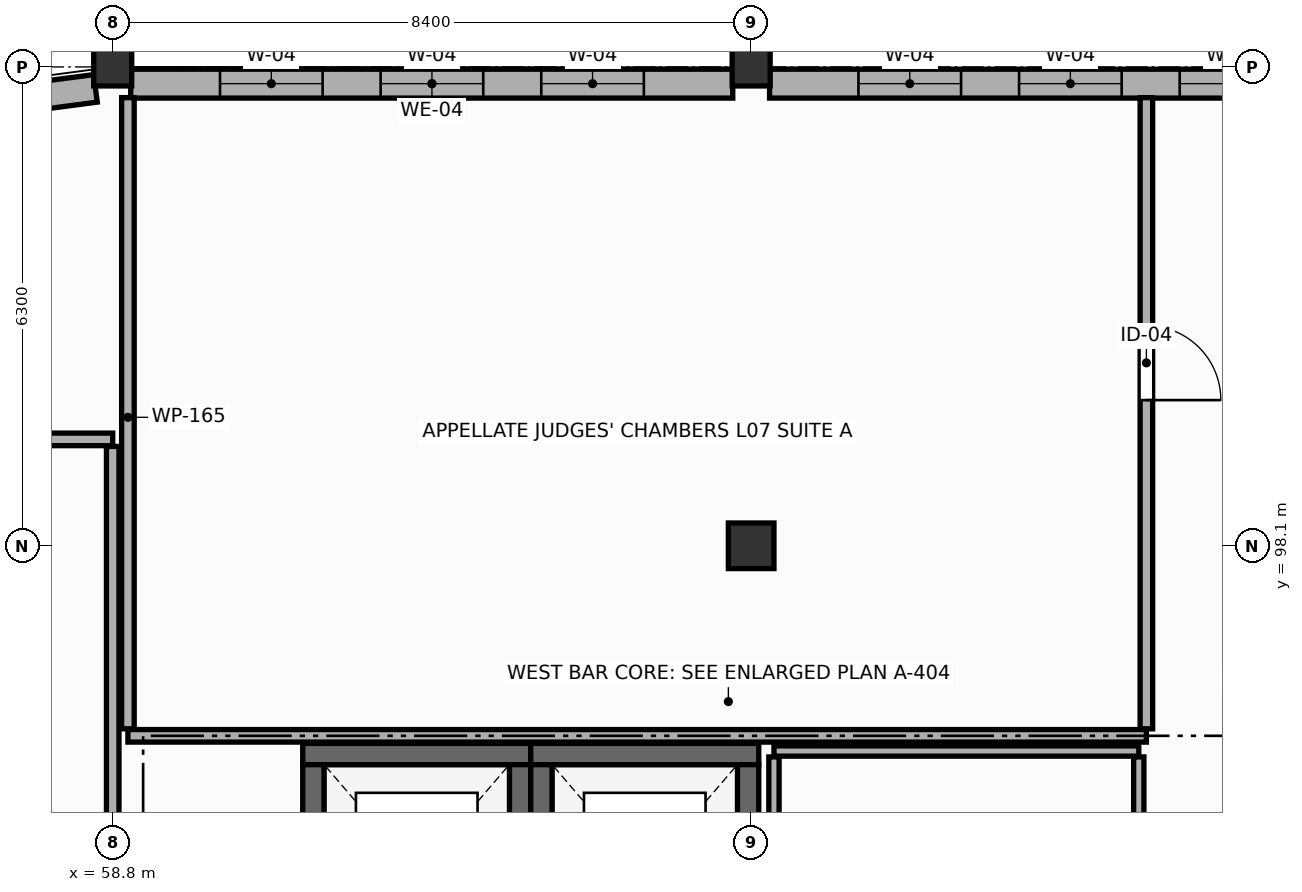
"""IFC4 building model, lengths in metres.
Left out: names, types, materials, properties, quantities, classifications, styles, units other than length and angle.
Written with IfcOpenShell. Run it as: python <this file> out.ifc"""

import sys

from ifc_helpers import new_model, si_unit, direction, frame, frame_2d, origin, origin_2d, place, context, subcontext, project, spatial, rectangle, extrude, element, fill, save


model = new_model("IFC4")
c1 = context("Model", 3, precision=1e-05, world=origin(), true_north=direction((0.0, 1.0)))
c2 = subcontext(c1, "Body", "Model", "MODEL_VIEW")
j1 = project(units=[si_unit("LENGTHUNIT", "METRE"), si_unit("PLANEANGLEUNIT", "RADIAN")], contexts=[c1])
p1 = place(None, origin())
s1 = spatial("IfcSite", under=j1, at=p1, CompositionType="ELEMENT")
p2 = place(p1, origin())
s2 = spatial("IfcBuilding", under=s1, at=p2, CompositionType="ELEMENT")
p3 = place(p2, frame((0.0, 0.0, 27.0)))
s3 = spatial("IfcBuildingStorey", under=s2, at=p3, CompositionType="ELEMENT", Elevation=27.0)
for number, where, z_axis, x_axis in (
    (1, (58.8, 104.4, 0.0), (0.0, 0.0, 1.0), (1.0, 0.0, 0.0)),
    (2, (67.2, 104.4, 0.0), (0.0, 0.0, 1.0), (1.0, 0.0, 0.0)),
):
    element("IfcColumn", number, at=place(p3, frame(where, z_axis=z_axis, x_axis=x_axis)), inside=s3, PredefinedType="COLUMN", context=c2, shape_type="SweptSolid", body=[
        extrude(rectangle(XDim=0.5, YDim=0.5, at=origin_2d()), origin(), (0.0, 0.0, 1.0), 4.2),
    ])
p4 = place(p3, frame((67.2, 98.1, 0.0), z_axis=(0.0, 0.0, 1.0), x_axis=(1.0, 0.0, 0.0)))
e3 = element("IfcColumn", 3, at=p4, inside=s3, PredefinedType="COLUMN", context=c2, shape_type="SweptSolid", body=[
    extrude(rectangle(XDim=0.6, YDim=0.6, at=origin_2d()), origin(), (0.0, 0.0, 1.0), 4.2),
])
p5 = place(p3, frame((59.037, 104.18, 0.0), z_axis=(0.0, 0.0, 1.0), x_axis=(1.0, 0.0, 0.0)))
e4 = element("IfcWall", 4, at=p5, inside=s3, PredefinedType="STANDARD", context=c2, shape_type="SweptSolid", body=[
    extrude(rectangle(XDim=7.921, YDim=0.38, at=frame_2d((3.96, 0.0))), origin(), (0.0, 0.0, 1.0), 3.11),
])
p6 = place(p5, frame((1.175, 0.0, 0.85)))
e5 = element("IfcOpeningElement", 5, at=p6, cuts=e4, PredefinedType="OPENING", context=c2, shape_type="SweptSolid", body=[
    extrude(rectangle(XDim=1.35, YDim=1.95, at=frame_2d((0.675, 0.975))), frame((0.0, 0.2, 0.0), z_axis=(0.0, -1.0, 0.0), x_axis=(1.0, 0.0, 0.0)), (0.0, 0.0, 1.0), 0.4),
])
p7 = place(p5, frame((3.288, 0.0, 0.85)))
e6 = element("IfcOpeningElement", 6, at=p7, cuts=e4, PredefinedType="OPENING", context=c2, shape_type="SweptSolid", body=[
    extrude(rectangle(XDim=1.35, YDim=1.95, at=frame_2d((0.675, 0.975))), frame((0.0, 0.2, 0.0), z_axis=(0.0, -1.0, 0.0), x_axis=(1.0, 0.0, 0.0)), (0.0, 0.0, 1.0), 0.4),
])
p8 = place(p5, frame((5.401, 0.0, 0.85)))
e7 = element("IfcOpeningElement", 7, at=p8, cuts=e4, PredefinedType="OPENING", context=c2, shape_type="SweptSolid", body=[
    extrude(rectangle(XDim=1.35, YDim=1.95, at=frame_2d((0.675, 0.975))), frame((0.0, 0.2, 0.0), z_axis=(0.0, -1.0, 0.0), x_axis=(1.0, 0.0, 0.0)), (0.0, 0.0, 1.0), 0.4),
])
p9 = place(p3, frame((67.442, 104.18, 0.0), z_axis=(0.0, 0.0, 1.0), x_axis=(1.0, 0.0, 0.0)))
e8 = element("IfcWall", 8, at=p9, inside=s3, PredefinedType="STANDARD", context=c2, shape_type="SweptSolid", body=[
    extrude(rectangle(XDim=7.916, YDim=0.38, at=frame_2d((3.958, 0.0))), origin(), (0.0, 0.0, 1.0), 3.11),
])
p10 = place(p9, frame((1.17, 0.0, 0.85)))
e9 = element("IfcOpeningElement", 9, at=p10, cuts=e8, PredefinedType="OPENING", context=c2, shape_type="SweptSolid", body=[
    extrude(rectangle(XDim=1.35, YDim=1.95, at=frame_2d((0.675, 0.975))), frame((0.0, 0.2, 0.0), z_axis=(0.0, -1.0, 0.0), x_axis=(1.0, 0.0, 0.0)), (0.0, 0.0, 1.0), 0.4),
])
p11 = place(p9, frame((3.283, 0.0, 0.85)))
e10 = element("IfcOpeningElement", 10, at=p11, cuts=e8, PredefinedType="OPENING", context=c2, shape_type="SweptSolid", body=[
    extrude(rectangle(XDim=1.35, YDim=1.95, at=frame_2d((0.675, 0.975))), frame((0.0, 0.2, 0.0), z_axis=(0.0, -1.0, 0.0), x_axis=(1.0, 0.0, 0.0)), (0.0, 0.0, 1.0), 0.4),
])
p12 = place(p9, frame((5.396, 0.0, 0.85)))
e11 = element("IfcOpeningElement", 11, at=p12, cuts=e8, PredefinedType="OPENING", context=c2, shape_type="SweptSolid", body=[
    extrude(rectangle(XDim=1.35, YDim=1.95, at=frame_2d((0.675, 0.975))), frame((0.0, 0.2, 0.0), z_axis=(0.0, -1.0, 0.0), x_axis=(1.0, 0.0, 0.0)), (0.0, 0.0, 1.0), 0.4),
])
p13 = place(p3, frame((58.573, 104.118, 0.0), z_axis=(0.0, 0.0, 1.0), x_axis=(-0.991449079029, -0.130494151946, 0.0)))
e12 = element("IfcWall", 12, at=p13, inside=s3, PredefinedType="ELEMENTEDWALL", context=c2, shape_type="SweptSolid", body=[
    extrude(rectangle(XDim=3.027, YDim=0.365, at=frame_2d((1.514, 0.0))), origin(), (0.0, 0.0, 1.0), 3.11),
])
p14 = place(p13, frame((1.128, 0.0, 0.85)))
e13 = element("IfcOpeningElement", 13, at=p14, cuts=e12, PredefinedType="OPENING", context=c2, shape_type="SweptSolid", body=[
    extrude(rectangle(XDim=0.8, YDim=1.7, at=frame_2d((0.4, 0.85))), frame((0.0, 0.192, 0.0), z_axis=(0.0, -1.0, 0.0), x_axis=(1.0, 0.0, 0.0)), (0.0, 0.0, 1.0), 0.385),
])
p15 = place(p3, frame((61.3, 95.36, 0.0), z_axis=(0.0, 0.0, 1.0), x_axis=(1.0, 0.0, 0.0)))
e14 = element("IfcWall", 14, at=p15, inside=s3, PredefinedType="SHEAR", context=c2, shape_type="SweptSolid", body=[
    extrude(rectangle(XDim=3.0, YDim=0.28, at=frame_2d((1.5, 0.0))), origin(), (0.0, 0.0, 1.0), 3.98),
])
for number, where, z_axis, x_axis in (
    (15, (61.44, 92.38, 0.0), (0.0, 0.0, 1.0), (0.0, 1.0, 0.0)),
    (16, (64.16, 95.22, 0.0), (0.0, 0.0, 1.0), (0.0, -1.0, 0.0)),
):
    element("IfcWall", number, at=place(p3, frame(where, z_axis=z_axis, x_axis=x_axis)), inside=s3, PredefinedType="SHEAR", context=c2, shape_type="SweptSolid", body=[
        extrude(rectangle(XDim=2.84, YDim=0.28, at=frame_2d((1.42, 0.0))), origin(), (0.0, 0.0, 1.0), 3.98),
    ])
p16 = place(p3, frame((64.3, 95.36, 0.0), z_axis=(0.0, 0.0, 1.0), x_axis=(1.0, 0.0, 0.0)))
e17 = element("IfcWall", 17, at=p16, inside=s3, PredefinedType="SHEAR", context=c2, shape_type="SweptSolid", body=[
    extrude(rectangle(XDim=3.0, YDim=0.28, at=frame_2d((1.5, 0.0))), origin(), (0.0, 0.0, 1.0), 3.98),
])
for number, where, z_axis, x_axis in (
    (18, (64.44, 92.38, 0.0), (0.0, 0.0, 1.0), (0.0, 1.0, 0.0)),
    (19, (67.16, 95.22, 0.0), (0.0, 0.0, 1.0), (0.0, -1.0, 0.0)),
):
    element("IfcWall", number, at=place(p3, frame(where, z_axis=z_axis, x_axis=x_axis)), inside=s3, PredefinedType="SHEAR", context=c2, shape_type="SweptSolid", body=[
        extrude(rectangle(XDim=2.84, YDim=0.28, at=frame_2d((1.42, 0.0))), origin(), (0.0, 0.0, 1.0), 3.98),
    ])
p17 = place(p3, frame((72.4, 95.6, 0.0), z_axis=(0.0, 0.0, 1.0), x_axis=(-1.0, 0.0, 0.0)))
e20 = element("IfcWall", 20, at=p17, inside=s3, PredefinedType="PARTITIONING", context=c2, shape_type="SweptSolid", body=[
    extrude(rectangle(XDim=13.4, YDim=0.165, at=frame_2d((6.7, 0.0))), origin(), (0.0, 0.0, 1.0), 3.11),
])
p18 = place(p3, frame((59.0, 95.692, 0.0), z_axis=(0.0, 0.0, 1.0), x_axis=(0.0, 1.0, 0.0)))
e21 = element("IfcWall", 21, at=p18, inside=s3, PredefinedType="PARTITIONING", context=c2, shape_type="SweptSolid", body=[
    extrude(rectangle(XDim=8.304, YDim=0.165, at=frame_2d((4.152, 0.0))), origin(), (0.0, 0.0, 1.0), 3.11),
])
p19 = place(p3, frame((72.4, 103.996, 0.0), z_axis=(0.0, 0.0, 1.0), x_axis=(0.0, -1.0, 0.0)))
e22 = element("IfcWall", 22, at=p19, inside=s3, PredefinedType="PARTITIONING", context=c2, shape_type="SweptSolid", body=[
    extrude(rectangle(XDim=8.304, YDim=0.165, at=frame_2d((4.152, 0.0))), origin(), (0.0, 0.0, 1.0), 3.965),
])
p20 = place(p19, frame((3.0, 0.0, 0.0)))
e23 = element("IfcOpeningElement", 23, at=p20, cuts=e22, PredefinedType="OPENING", context=c2, shape_type="SweptSolid", body=[
    extrude(rectangle(XDim=0.98, YDim=2.2, at=frame_2d((0.49, 1.1))), frame((0.0, 0.093, 0.0), z_axis=(0.0, -1.0, 0.0), x_axis=(1.0, 0.0, 0.0)), (0.0, 0.0, 1.0), 0.185),
])
p21 = place(p3, frame((67.5, 95.4, 0.0), z_axis=(0.0, 0.0, 1.0), x_axis=(1.0, 0.0, 0.0)))
e24 = element("IfcWall", 24, at=p21, inside=s3, PredefinedType="PARTITIONING", context=c2, shape_type="SweptSolid", body=[
    extrude(rectangle(XDim=4.8, YDim=0.135, at=frame_2d((2.4, 0.0))), origin(), (0.0, 0.0, 1.0), 3.51),
])
for number, where, z_axis, x_axis in (
    (25, (67.5, 92.028, 0.0), (0.0, 0.0, 1.0), (0.0, 1.0, 0.0)),
    (26, (72.3, 95.323, 0.0), (0.0, 0.0, 1.0), (0.0, -1.0, 0.0)),
):
    element("IfcWall", number, at=place(p3, frame(where, z_axis=z_axis, x_axis=x_axis)), inside=s3, PredefinedType="PARTITIONING", context=c2, shape_type="SweptSolid", body=[
        extrude(rectangle(XDim=3.295, YDim=0.135, at=frame_2d((1.647, 0.0))), origin(), (0.0, 0.0, 1.0), 3.41),
    ])
p22 = place(p3, frame((49.3, 99.5, 0.0), z_axis=(0.0, 0.0, 1.0), x_axis=(1.0, 0.0, 0.0)))
e27 = element("IfcWall", 27, at=p22, inside=s3, PredefinedType="PARTITIONING", context=c2, shape_type="SweptSolid", body=[
    extrude(rectangle(XDim=9.5, YDim=0.165, at=frame_2d((4.75, 0.0))), origin(), (0.0, 0.0, 1.0), 3.01),
])
p23 = place(p3, frame((58.8, 99.407, 0.0), z_axis=(0.0, 0.0, 1.0), x_axis=(0.0, -1.0, 0.0)))
e28 = element("IfcWall", 28, at=p23, inside=s3, PredefinedType="PARTITIONING", context=c2, shape_type="SweptSolid", body=[
    extrude(rectangle(XDim=7.365, YDim=0.165, at=frame_2d((3.683, 0.0))), origin(), (0.0, 0.0, 1.0), 3.11),
])
p24 = place(p6, origin())
e29 = element("IfcWindow", 29, at=p24, inside=s3, PartitioningType="SINGLE_PANEL", PredefinedType="WINDOW", context=c2, shape_type="SweptSolid", body=[
    extrude(rectangle(XDim=1.35, YDim=1.95, at=frame_2d((0.675, 0.975))), frame((0.0, 0.03, 0.0), z_axis=(0.0, -1.0, 0.0), x_axis=(1.0, 0.0, 0.0)), (0.0, 0.0, 1.0), 0.06),
])
fill(e5, e29)
p25 = place(p7, origin())
e30 = element("IfcWindow", 30, at=p25, inside=s3, PartitioningType="SINGLE_PANEL", PredefinedType="WINDOW", context=c2, shape_type="SweptSolid", body=[
    extrude(rectangle(XDim=1.35, YDim=1.95, at=frame_2d((0.675, 0.975))), frame((0.0, 0.03, 0.0), z_axis=(0.0, -1.0, 0.0), x_axis=(1.0, 0.0, 0.0)), (0.0, 0.0, 1.0), 0.06),
])
fill(e6, e30)
p26 = place(p8, origin())
e31 = element("IfcWindow", 31, at=p26, inside=s3, PartitioningType="SINGLE_PANEL", PredefinedType="WINDOW", context=c2, shape_type="SweptSolid", body=[
    extrude(rectangle(XDim=1.35, YDim=1.95, at=frame_2d((0.675, 0.975))), frame((0.0, 0.03, 0.0), z_axis=(0.0, -1.0, 0.0), x_axis=(1.0, 0.0, 0.0)), (0.0, 0.0, 1.0), 0.06),
])
fill(e7, e31)
p27 = place(p10, origin())
e32 = element("IfcWindow", 32, at=p27, inside=s3, PartitioningType="SINGLE_PANEL", PredefinedType="WINDOW", context=c2, shape_type="SweptSolid", body=[
    extrude(rectangle(XDim=1.35, YDim=1.95, at=frame_2d((0.675, 0.975))), frame((0.0, 0.03, 0.0), z_axis=(0.0, -1.0, 0.0), x_axis=(1.0, 0.0, 0.0)), (0.0, 0.0, 1.0), 0.06),
])
fill(e9, e32)
p28 = place(p11, origin())
e33 = element("IfcWindow", 33, at=p28, inside=s3, PartitioningType="SINGLE_PANEL", PredefinedType="WINDOW", context=c2, shape_type="SweptSolid", body=[
    extrude(rectangle(XDim=1.35, YDim=1.95, at=frame_2d((0.675, 0.975))), frame((0.0, 0.03, 0.0), z_axis=(0.0, -1.0, 0.0), x_axis=(1.0, 0.0, 0.0)), (0.0, 0.0, 1.0), 0.06),
])
fill(e10, e33)
p29 = place(p12, origin())
e34 = element("IfcWindow", 34, at=p29, inside=s3, PartitioningType="SINGLE_PANEL", PredefinedType="WINDOW", context=c2, shape_type="SweptSolid", body=[
    extrude(rectangle(XDim=1.35, YDim=1.95, at=frame_2d((0.675, 0.975))), frame((0.0, 0.03, 0.0), z_axis=(0.0, -1.0, 0.0), x_axis=(1.0, 0.0, 0.0)), (0.0, 0.0, 1.0), 0.06),
])
fill(e11, e34)
p30 = place(p20, origin())
e35 = element("IfcDoor", 35, at=p30, inside=s3, OperationType="SINGLE_SWING_RIGHT", PredefinedType="DOOR", context=c2, shape_type="SweptSolid", body=[
    extrude(rectangle(XDim=0.98, YDim=2.2, at=frame_2d((0.49, 1.1))), frame((0.0, 0.025, 0.0), z_axis=(0.0, -1.0, 0.0), x_axis=(1.0, 0.0, 0.0)), (0.0, 0.0, 1.0), 0.05),
])
fill(e23, e35)
save(model, sys.argv[1])
